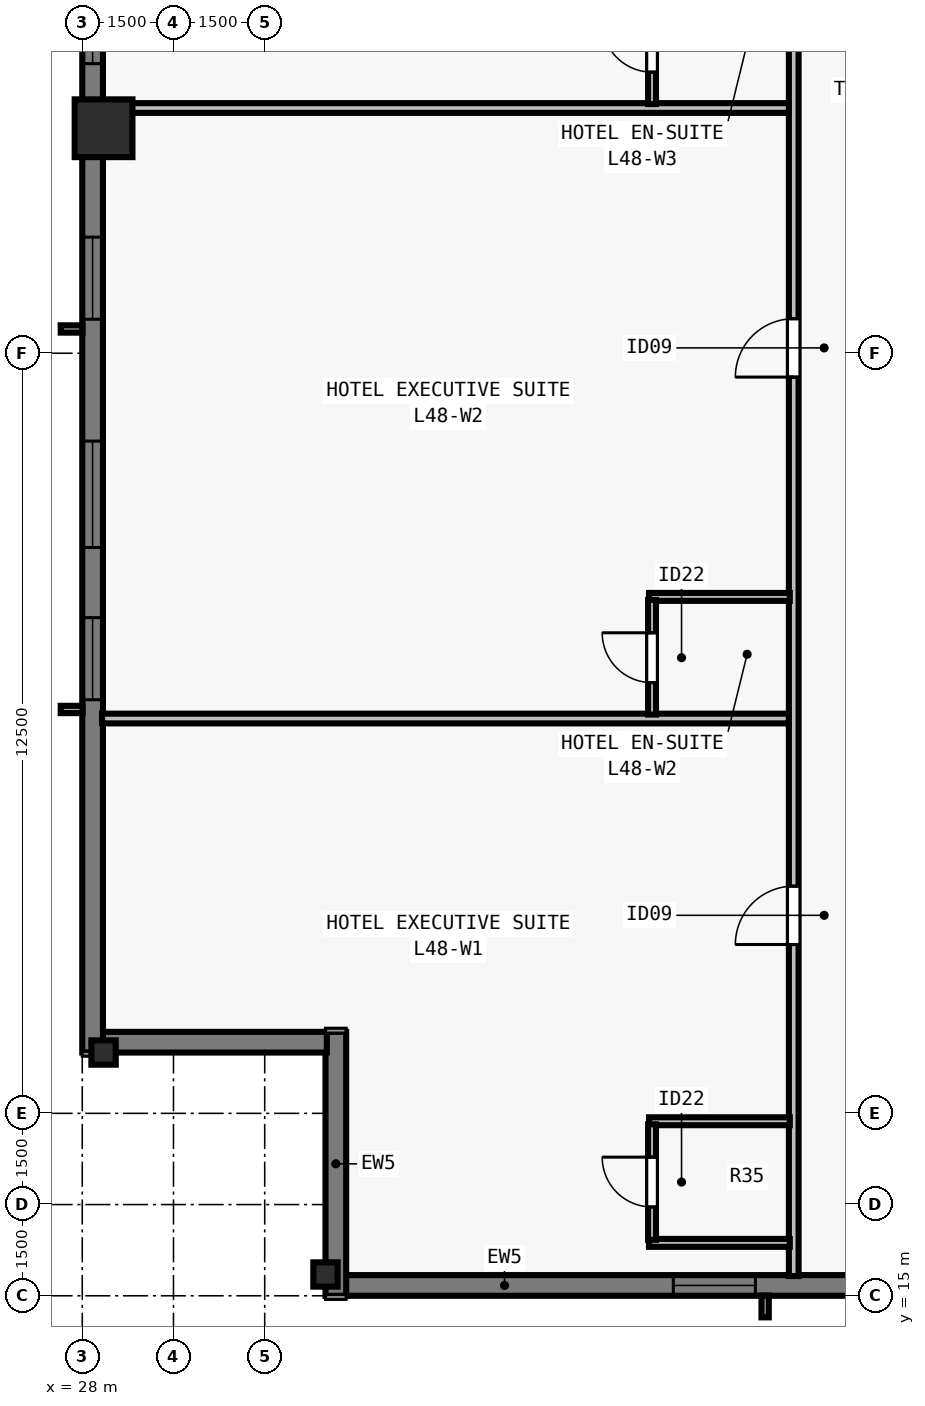
"""IFC4 building model, lengths in metres.
Left out: names, types, materials, properties, quantities, classifications, styles, units other than length and angle.
Written with IfcOpenShell. Run it as: python <this file> out.ifc"""

import sys

from ifc_helpers import new_model, si_unit, direction, frame, frame_2d, origin, origin_2d, place, context, subcontext, project, spatial, rectangle, i_section, extrude, element, fill, save


model = new_model("IFC4")
c1 = context("Model", 3, precision=1e-05, world=origin(), true_north=direction((0.0, 1.0)))
c2 = subcontext(c1, "Body", "Model", "MODEL_VIEW")
j1 = project(units=[si_unit("LENGTHUNIT", "METRE"), si_unit("PLANEANGLEUNIT", "RADIAN")], contexts=[c1])
p1 = place(None, origin())
s1 = spatial("IfcSite", under=j1, at=p1, CompositionType="ELEMENT")
p2 = place(p1, origin())
s2 = spatial("IfcBuilding", under=s1, at=p2, CompositionType="ELEMENT")
p3 = place(p2, frame((0.0, 0.0, 176.0)))
s3 = spatial("IfcBuildingStorey", under=s2, at=p3, CompositionType="ELEMENT", Elevation=176.0)
p4 = place(p3, frame((32.0, 15.35, 0.0), z_axis=(0.0, 0.0, 1.0), x_axis=(1.0, 0.0, 0.0)))
e1 = element("IfcColumn", 1, at=p4, inside=s3, PredefinedType="COLUMN", context=c2, shape_type="SweptSolid", body=[
    extrude(i_section(OverallWidth=0.4, OverallDepth=0.4, WebThickness=0.022, FlangeThickness=0.036, at=origin_2d()), origin(), (0.0, 0.0, 1.0), 3.5),
])
p5 = place(p3, frame((28.35, 34.2, 0.0), z_axis=(0.0, 0.0, 1.0), x_axis=(0.0, 1.0, 0.0)))
e2 = element("IfcColumn", 2, at=p5, inside=s3, PredefinedType="COLUMN", context=c2, shape_type="SweptSolid", body=[
    extrude(rectangle(XDim=0.95, YDim=0.95, at=origin_2d()), origin(), (0.0, 0.0, 1.0), 3.5),
])
p6 = place(p3, frame((28.35, 19.0, 0.0), z_axis=(0.0, 0.0, 1.0), x_axis=(0.0, 1.0, 0.0)))
e3 = element("IfcColumn", 3, at=p6, inside=s3, PredefinedType="COLUMN", context=c2, shape_type="SweptSolid", body=[
    extrude(i_section(OverallWidth=0.4, OverallDepth=0.4, WebThickness=0.022, FlangeThickness=0.036, at=origin_2d()), origin(), (0.0, 0.0, 1.0), 3.5),
])
p7 = place(p3, frame((72.0, 15.17, 0.0), z_axis=(0.0, 0.0, 1.0), x_axis=(-1.0, 0.0, 0.0)))
e4 = element("IfcWall", 4, at=p7, inside=s3, PredefinedType="SOLIDWALL", context=c2, shape_type="SweptSolid", body=[
    extrude(rectangle(XDim=39.682, YDim=0.34, at=frame_2d((19.841, 0.0))), origin(), (0.0, 0.0, 1.0), 3.28),
])
p8 = place(p7, frame((4.102, 0.0, 0.8)))
e5 = element("IfcOpeningElement", 5, at=p8, cuts=e4, PredefinedType="OPENING", context=c2, shape_type="SweptSolid", body=[
    extrude(rectangle(XDim=1.35, YDim=1.66, at=frame_2d((0.675, 0.83))), frame((0.0, 0.18, 0.0), z_axis=(0.0, -1.0, 0.0), x_axis=(1.0, 0.0, 0.0)), (0.0, 0.0, 1.0), 0.36),
])
p9 = place(p7, frame((8.305, 0.0, 0.8)))
e6 = element("IfcOpeningElement", 6, at=p9, cuts=e4, PredefinedType="OPENING", context=c2, shape_type="SweptSolid", body=[
    extrude(rectangle(XDim=1.75, YDim=1.66, at=frame_2d((0.875, 0.83))), frame((0.0, 0.18, 0.0), z_axis=(0.0, -1.0, 0.0), x_axis=(1.0, 0.0, 0.0)), (0.0, 0.0, 1.0), 0.36),
])
p10 = place(p7, frame((12.059, 0.0, 0.8)))
e7 = element("IfcOpeningElement", 7, at=p10, cuts=e4, PredefinedType="OPENING", context=c2, shape_type="SweptSolid", body=[
    extrude(rectangle(XDim=1.35, YDim=1.66, at=frame_2d((0.675, 0.83))), frame((0.0, 0.18, 0.0), z_axis=(0.0, -1.0, 0.0), x_axis=(1.0, 0.0, 0.0)), (0.0, 0.0, 1.0), 0.36),
])
p11 = place(p7, frame((16.262, 0.0, 0.8)))
e8 = element("IfcOpeningElement", 8, at=p11, cuts=e4, PredefinedType="OPENING", context=c2, shape_type="SweptSolid", body=[
    extrude(rectangle(XDim=1.75, YDim=1.66, at=frame_2d((0.875, 0.83))), frame((0.0, 0.18, 0.0), z_axis=(0.0, -1.0, 0.0), x_axis=(1.0, 0.0, 0.0)), (0.0, 0.0, 1.0), 0.36),
])
p12 = place(p7, frame((19.166, 0.0, 0.8)))
e9 = element("IfcOpeningElement", 9, at=p12, cuts=e4, PredefinedType="OPENING", context=c2, shape_type="SweptSolid", body=[
    extrude(rectangle(XDim=1.35, YDim=1.66, at=frame_2d((0.675, 0.83))), frame((0.0, 0.18, 0.0), z_axis=(0.0, -1.0, 0.0), x_axis=(1.0, 0.0, 0.0)), (0.0, 0.0, 1.0), 0.36),
])
p13 = place(p7, frame((21.27, 0.0, 0.8)))
e10 = element("IfcOpeningElement", 10, at=p13, cuts=e4, PredefinedType="OPENING", context=c2, shape_type="SweptSolid", body=[
    extrude(rectangle(XDim=1.75, YDim=1.66, at=frame_2d((0.875, 0.83))), frame((0.0, 0.18, 0.0), z_axis=(0.0, -1.0, 0.0), x_axis=(1.0, 0.0, 0.0)), (0.0, 0.0, 1.0), 0.36),
])
p14 = place(p7, frame((26.273, 0.0, 0.8)))
e11 = element("IfcOpeningElement", 11, at=p14, cuts=e4, PredefinedType="OPENING", context=c2, shape_type="SweptSolid", body=[
    extrude(rectangle(XDim=1.35, YDim=1.66, at=frame_2d((0.675, 0.83))), frame((0.0, 0.18, 0.0), z_axis=(0.0, -1.0, 0.0), x_axis=(1.0, 0.0, 0.0)), (0.0, 0.0, 1.0), 0.36),
])
p15 = place(p7, frame((32.93, 0.0, 0.8)))
e12 = element("IfcOpeningElement", 12, at=p15, cuts=e4, PredefinedType="OPENING", context=c2, shape_type="SweptSolid", body=[
    extrude(rectangle(XDim=1.35, YDim=1.66, at=frame_2d((0.675, 0.83))), frame((0.0, 0.18, 0.0), z_axis=(0.0, -1.0, 0.0), x_axis=(1.0, 0.0, 0.0)), (0.0, 0.0, 1.0), 0.36),
])
p16 = place(p3, frame((32.17, 15.0, 0.0), z_axis=(0.0, 0.0, 1.0), x_axis=(0.0, 1.0, 0.0)))
e13 = element("IfcWall", 13, at=p16, inside=s3, PredefinedType="SOLIDWALL", context=c2, shape_type="SweptSolid", body=[
    extrude(rectangle(XDim=4.34, YDim=0.34, at=frame_2d((2.17, 0.0))), origin(), (0.0, 0.0, 1.0), 3.28),
])
p17 = place(p3, frame((32.022, 19.17, 0.0), z_axis=(0.0, 0.0, 1.0), x_axis=(-1.0, 0.0, 0.0)))
e14 = element("IfcWall", 14, at=p17, inside=s3, PredefinedType="SOLIDWALL", context=c2, shape_type="SweptSolid", body=[
    extrude(rectangle(XDim=3.704, YDim=0.34, at=frame_2d((1.852, 0.0))), origin(), (0.0, 0.0, 1.0), 3.28),
])
p18 = place(p3, frame((28.17, 19.0, 0.0), z_axis=(0.0, 0.0, 1.0), x_axis=(0.0, 1.0, 0.0)))
e15 = element("IfcWall", 15, at=p18, inside=s3, PredefinedType="SOLIDWALL", context=c2, shape_type="SweptSolid", body=[
    extrude(rectangle(XDim=39.682, YDim=0.34, at=frame_2d((19.841, 0.0))), origin(), (0.0, 0.0, 1.0), 3.28),
])
p19 = place(p18, frame((5.802, 0.0, 0.8)))
e16 = element("IfcOpeningElement", 16, at=p19, cuts=e15, PredefinedType="OPENING", context=c2, shape_type="SweptSolid", body=[
    extrude(rectangle(XDim=1.35, YDim=1.66, at=frame_2d((0.675, 0.83))), frame((0.0, 0.18, 0.0), z_axis=(0.0, -1.0, 0.0), x_axis=(1.0, 0.0, 0.0)), (0.0, 0.0, 1.0), 0.36),
])
p20 = place(p18, frame((8.305, 0.0, 0.8)))
e17 = element("IfcOpeningElement", 17, at=p20, cuts=e15, PredefinedType="OPENING", context=c2, shape_type="SweptSolid", body=[
    extrude(rectangle(XDim=1.75, YDim=1.66, at=frame_2d((0.875, 0.83))), frame((0.0, 0.18, 0.0), z_axis=(0.0, -1.0, 0.0), x_axis=(1.0, 0.0, 0.0)), (0.0, 0.0, 1.0), 0.36),
])
p21 = place(p18, frame((12.059, 0.0, 0.8)))
e18 = element("IfcOpeningElement", 18, at=p21, cuts=e15, PredefinedType="OPENING", context=c2, shape_type="SweptSolid", body=[
    extrude(rectangle(XDim=1.35, YDim=1.66, at=frame_2d((0.675, 0.83))), frame((0.0, 0.18, 0.0), z_axis=(0.0, -1.0, 0.0), x_axis=(1.0, 0.0, 0.0)), (0.0, 0.0, 1.0), 0.36),
])
p22 = place(p18, frame((16.262, 0.0, 0.8)))
e19 = element("IfcOpeningElement", 19, at=p22, cuts=e15, PredefinedType="OPENING", context=c2, shape_type="SweptSolid", body=[
    extrude(rectangle(XDim=1.75, YDim=1.66, at=frame_2d((0.875, 0.83))), frame((0.0, 0.18, 0.0), z_axis=(0.0, -1.0, 0.0), x_axis=(1.0, 0.0, 0.0)), (0.0, 0.0, 1.0), 0.36),
])
p23 = place(p18, frame((19.166, 0.0, 0.8)))
e20 = element("IfcOpeningElement", 20, at=p23, cuts=e15, PredefinedType="OPENING", context=c2, shape_type="SweptSolid", body=[
    extrude(rectangle(XDim=1.35, YDim=1.66, at=frame_2d((0.675, 0.83))), frame((0.0, 0.18, 0.0), z_axis=(0.0, -1.0, 0.0), x_axis=(1.0, 0.0, 0.0)), (0.0, 0.0, 1.0), 0.36),
])
p24 = place(p18, frame((22.07, 0.0, 0.8)))
e21 = element("IfcOpeningElement", 21, at=p24, cuts=e15, PredefinedType="OPENING", context=c2, shape_type="SweptSolid", body=[
    extrude(rectangle(XDim=1.75, YDim=1.66, at=frame_2d((0.875, 0.83))), frame((0.0, 0.18, 0.0), z_axis=(0.0, -1.0, 0.0), x_axis=(1.0, 0.0, 0.0)), (0.0, 0.0, 1.0), 0.36),
])
p25 = place(p18, frame((26.273, 0.0, 0.8)))
e22 = element("IfcOpeningElement", 22, at=p25, cuts=e15, PredefinedType="OPENING", context=c2, shape_type="SweptSolid", body=[
    extrude(rectangle(XDim=1.35, YDim=1.66, at=frame_2d((0.675, 0.83))), frame((0.0, 0.18, 0.0), z_axis=(0.0, -1.0, 0.0), x_axis=(1.0, 0.0, 0.0)), (0.0, 0.0, 1.0), 0.36),
])
p26 = place(p18, frame((29.627, 0.0, 0.8)))
e23 = element("IfcOpeningElement", 23, at=p26, cuts=e15, PredefinedType="OPENING", context=c2, shape_type="SweptSolid", body=[
    extrude(rectangle(XDim=1.75, YDim=1.66, at=frame_2d((0.875, 0.83))), frame((0.0, 0.18, 0.0), z_axis=(0.0, -1.0, 0.0), x_axis=(1.0, 0.0, 0.0)), (0.0, 0.0, 1.0), 0.36),
])
p27 = place(p18, frame((32.53, 0.0, 0.8)))
e24 = element("IfcOpeningElement", 24, at=p27, cuts=e15, PredefinedType="OPENING", context=c2, shape_type="SweptSolid", body=[
    extrude(rectangle(XDim=1.35, YDim=1.66, at=frame_2d((0.675, 0.83))), frame((0.0, 0.18, 0.0), z_axis=(0.0, -1.0, 0.0), x_axis=(1.0, 0.0, 0.0)), (0.0, 0.0, 1.0), 0.36),
])
p28 = place(p3, frame((39.7, 15.325, 0.0), z_axis=(0.0, 0.0, 1.0), x_axis=(0.0, 1.0, 0.0)))
e25 = element("IfcWall", 25, at=p28, inside=s3, PredefinedType="PARTITIONING", context=c2, shape_type="SweptSolid", body=[
    extrude(rectangle(XDim=47.35, YDim=0.16, at=frame_2d((23.675, 0.0))), origin(), (0.0, 0.0, 1.0), 2.555),
])
p29 = place(p28, frame((5.451, 0.0, 0.0)))
e26 = element("IfcOpeningElement", 26, at=p29, cuts=e25, PredefinedType="OPENING", context=c2, shape_type="SweptSolid", body=[
    extrude(rectangle(XDim=0.96, YDim=2.15, at=frame_2d((0.48, 1.075))), frame((0.0, 0.09, 0.0), z_axis=(0.0, -1.0, 0.0), x_axis=(1.0, 0.0, 0.0)), (0.0, 0.0, 1.0), 0.18),
])
p30 = place(p28, frame((14.783, 0.0, 0.0)))
e27 = element("IfcOpeningElement", 27, at=p30, cuts=e25, PredefinedType="OPENING", context=c2, shape_type="SweptSolid", body=[
    extrude(rectangle(XDim=0.96, YDim=2.15, at=frame_2d((0.48, 1.075))), frame((0.0, 0.09, 0.0), z_axis=(0.0, -1.0, 0.0), x_axis=(1.0, 0.0, 0.0)), (0.0, 0.0, 1.0), 0.18),
])
p31 = place(p28, frame((24.215, 0.0, 0.0)))
e28 = element("IfcOpeningElement", 28, at=p31, cuts=e25, PredefinedType="OPENING", context=c2, shape_type="SweptSolid", body=[
    extrude(rectangle(XDim=0.96, YDim=2.15, at=frame_2d((0.48, 1.075))), frame((0.0, 0.09, 0.0), z_axis=(0.0, -1.0, 0.0), x_axis=(1.0, 0.0, 0.0)), (0.0, 0.0, 1.0), 0.18),
])
p32 = place(p28, frame((33.647, 0.0, 0.0)))
e29 = element("IfcOpeningElement", 29, at=p32, cuts=e25, PredefinedType="OPENING", context=c2, shape_type="SweptSolid", body=[
    extrude(rectangle(XDim=0.96, YDim=2.15, at=frame_2d((0.48, 1.075))), frame((0.0, 0.09, 0.0), z_axis=(0.0, -1.0, 0.0), x_axis=(1.0, 0.0, 0.0)), (0.0, 0.0, 1.0), 0.18),
])
p33 = place(p28, frame((43.258, 0.0, 0.0)))
e30 = element("IfcOpeningElement", 30, at=p33, cuts=e25, PredefinedType="OPENING", context=c2, shape_type="SweptSolid", body=[
    extrude(rectangle(XDim=0.96, YDim=2.15, at=frame_2d((0.48, 1.075))), frame((0.0, 0.09, 0.0), z_axis=(0.0, -1.0, 0.0), x_axis=(1.0, 0.0, 0.0)), (0.0, 0.0, 1.0), 0.18),
])
for number, where, z_axis, x_axis in (
    (31, (37.32, 15.87, 0.0), (0.0, 0.0, 1.0), (1.0, 0.0, 0.0)),
    (32, (37.32, 17.87, 0.0), (0.0, 0.0, 1.0), (1.0, 0.0, 0.0)),
):
    element("IfcWall", number, at=place(p3, frame(where, z_axis=z_axis, x_axis=x_axis)), inside=s3, PredefinedType="PLUMBINGWALL", context=c2, shape_type="SweptSolid", body=[
        extrude(rectangle(XDim=2.315, YDim=0.13, at=frame_2d((1.157, 0.0))), origin(), (0.0, 0.0, 1.0), 3.28),
    ])
p34 = place(p3, frame((37.37, 15.92, 0.0), z_axis=(0.0, 0.0, 1.0), x_axis=(0.0, 1.0, 0.0)))
e33 = element("IfcWall", 33, at=p34, inside=s3, PredefinedType="PLUMBINGWALL", context=c2, shape_type="SweptSolid", body=[
    extrude(rectangle(XDim=1.9, YDim=0.13, at=frame_2d((0.95, 0.0))), origin(), (0.0, 0.0, 1.0), 3.28),
])
p35 = place(p34, frame((0.54, 0.0, 0.0)))
e34 = element("IfcOpeningElement", 34, at=p35, cuts=e33, PredefinedType="OPENING", context=c2, shape_type="SweptSolid", body=[
    extrude(rectangle(XDim=0.82, YDim=2.1, at=frame_2d((0.41, 1.05))), frame((0.0, 0.075, 0.0), z_axis=(0.0, -1.0, 0.0), x_axis=(1.0, 0.0, 0.0)), (0.0, 0.0, 1.0), 0.15),
])
p36 = place(p3, frame((28.325, 24.493, 0.0), z_axis=(0.0, 0.0, 1.0), x_axis=(1.0, 0.0, 0.0)))
e35 = element("IfcWall", 35, at=p36, inside=s3, PredefinedType="PARTITIONING", context=c2, shape_type="SweptSolid", body=[
    extrude(rectangle(XDim=11.295, YDim=0.16, at=frame_2d((5.647, 0.0))), origin(), (0.0, 0.0, 1.0), 2.896),
])
p37 = place(p3, frame((37.32, 26.493, 0.0), z_axis=(0.0, 0.0, 1.0), x_axis=(1.0, 0.0, 0.0)))
e36 = element("IfcWall", 36, at=p37, inside=s3, PredefinedType="PLUMBINGWALL", context=c2, shape_type="SweptSolid", body=[
    extrude(rectangle(XDim=2.315, YDim=0.13, at=frame_2d((1.157, 0.0))), origin(), (0.0, 0.0, 1.0), 2.896),
])
p38 = place(p3, frame((37.37, 24.558, 0.0), z_axis=(0.0, 0.0, 1.0), x_axis=(0.0, 1.0, 0.0)))
e37 = element("IfcWall", 37, at=p38, inside=s3, PredefinedType="PLUMBINGWALL", context=c2, shape_type="SweptSolid", body=[
    extrude(rectangle(XDim=1.885, YDim=0.13, at=frame_2d((0.942, 0.0))), origin(), (0.0, 0.0, 1.0), 3.28),
])
p39 = place(p38, frame((0.525, 0.0, 0.0)))
e38 = element("IfcOpeningElement", 38, at=p39, cuts=e37, PredefinedType="OPENING", context=c2, shape_type="SweptSolid", body=[
    extrude(rectangle(XDim=0.82, YDim=2.1, at=frame_2d((0.41, 1.05))), frame((0.0, 0.075, 0.0), z_axis=(0.0, -1.0, 0.0), x_axis=(1.0, 0.0, 0.0)), (0.0, 0.0, 1.0), 0.15),
])
p40 = place(p3, frame((28.325, 34.533, 0.0), z_axis=(0.0, 0.0, 1.0), x_axis=(1.0, 0.0, 0.0)))
e39 = element("IfcWall", 39, at=p40, inside=s3, PredefinedType="PARTITIONING", context=c2, shape_type="SweptSolid", body=[
    extrude(rectangle(XDim=11.295, YDim=0.16, at=frame_2d((5.647, 0.0))), origin(), (0.0, 0.0, 1.0), 2.896),
])
p41 = place(p3, frame((37.37, 34.598, 0.0), z_axis=(0.0, 0.0, 1.0), x_axis=(0.0, 1.0, 0.0)))
e40 = element("IfcWall", 40, at=p41, inside=s3, PredefinedType="PLUMBINGWALL", context=c2, shape_type="SweptSolid", body=[
    extrude(rectangle(XDim=1.885, YDim=0.13, at=frame_2d((0.942, 0.0))), origin(), (0.0, 0.0, 1.0), 3.28),
])
p42 = place(p41, frame((0.525, 0.0, 0.0)))
e41 = element("IfcOpeningElement", 41, at=p42, cuts=e40, PredefinedType="OPENING", context=c2, shape_type="SweptSolid", body=[
    extrude(rectangle(XDim=0.82, YDim=2.1, at=frame_2d((0.41, 1.05))), frame((0.0, 0.075, 0.0), z_axis=(0.0, -1.0, 0.0), x_axis=(1.0, 0.0, 0.0)), (0.0, 0.0, 1.0), 0.15),
])
p43 = place(p15, origin())
e42 = element("IfcWindow", 42, at=p43, inside=s3, PartitioningType="SINGLE_PANEL", PredefinedType="WINDOW", context=c2, shape_type="SweptSolid", body=[
    extrude(rectangle(XDim=1.35, YDim=1.66, at=frame_2d((0.675, 0.83))), frame((0.0, -0.05, 0.0), z_axis=(0.0, -1.0, 0.0), x_axis=(1.0, 0.0, 0.0)), (0.0, 0.0, 1.0), 0.06),
])
fill(e12, e42)
p44 = place(p19, origin())
e43 = element("IfcWindow", 43, at=p44, inside=s3, PartitioningType="SINGLE_PANEL", PredefinedType="WINDOW", context=c2, shape_type="SweptSolid", body=[
    extrude(rectangle(XDim=1.35, YDim=1.66, at=frame_2d((0.675, 0.83))), frame((0.0, -0.05, 0.0), z_axis=(0.0, -1.0, 0.0), x_axis=(1.0, 0.0, 0.0)), (0.0, 0.0, 1.0), 0.06),
])
fill(e16, e43)
p45 = place(p20, origin())
e44 = element("IfcWindow", 44, at=p45, inside=s3, PartitioningType="SINGLE_PANEL", PredefinedType="WINDOW", context=c2, shape_type="SweptSolid", body=[
    extrude(rectangle(XDim=1.75, YDim=1.66, at=frame_2d((0.875, 0.83))), frame((0.0, -0.05, 0.0), z_axis=(0.0, -1.0, 0.0), x_axis=(1.0, 0.0, 0.0)), (0.0, 0.0, 1.0), 0.06),
])
fill(e17, e44)
p46 = place(p21, origin())
e45 = element("IfcWindow", 45, at=p46, inside=s3, PartitioningType="SINGLE_PANEL", PredefinedType="WINDOW", context=c2, shape_type="SweptSolid", body=[
    extrude(rectangle(XDim=1.35, YDim=1.66, at=frame_2d((0.675, 0.83))), frame((0.0, -0.05, 0.0), z_axis=(0.0, -1.0, 0.0), x_axis=(1.0, 0.0, 0.0)), (0.0, 0.0, 1.0), 0.06),
])
fill(e18, e45)
p47 = place(p22, origin())
e46 = element("IfcWindow", 46, at=p47, inside=s3, PartitioningType="SINGLE_PANEL", PredefinedType="WINDOW", context=c2, shape_type="SweptSolid", body=[
    extrude(rectangle(XDim=1.75, YDim=1.66, at=frame_2d((0.875, 0.83))), frame((0.0, -0.05, 0.0), z_axis=(0.0, -1.0, 0.0), x_axis=(1.0, 0.0, 0.0)), (0.0, 0.0, 1.0), 0.06),
])
fill(e19, e46)
p48 = place(p35, origin())
e47 = element("IfcDoor", 47, at=p48, inside=s3, OperationType="SINGLE_SWING_RIGHT", PredefinedType="DOOR", context=c2, shape_type="SweptSolid", body=[
    extrude(rectangle(XDim=0.82, YDim=2.1, at=frame_2d((0.41, 1.05))), frame((0.0, 0.025, 0.0), z_axis=(0.0, -1.0, 0.0), x_axis=(1.0, 0.0, 0.0)), (0.0, 0.0, 1.0), 0.05),
])
fill(e34, e47)
p49 = place(p29, origin())
e48 = element("IfcDoor", 48, at=p49, inside=s3, OperationType="SINGLE_SWING_LEFT", PredefinedType="DOOR", context=c2, shape_type="SweptSolid", body=[
    extrude(rectangle(XDim=0.96, YDim=2.15, at=frame_2d((0.48, 1.075))), frame((0.0, 0.025, 0.0), z_axis=(0.0, -1.0, 0.0), x_axis=(1.0, 0.0, 0.0)), (0.0, 0.0, 1.0), 0.05),
])
fill(e26, e48)
p50 = place(p39, origin())
e49 = element("IfcDoor", 49, at=p50, inside=s3, OperationType="SINGLE_SWING_RIGHT", PredefinedType="DOOR", context=c2, shape_type="SweptSolid", body=[
    extrude(rectangle(XDim=0.82, YDim=2.1, at=frame_2d((0.41, 1.05))), frame((0.0, 0.025, 0.0), z_axis=(0.0, -1.0, 0.0), x_axis=(1.0, 0.0, 0.0)), (0.0, 0.0, 1.0), 0.05),
])
fill(e38, e49)
p51 = place(p30, origin())
e50 = element("IfcDoor", 50, at=p51, inside=s3, OperationType="SINGLE_SWING_LEFT", PredefinedType="DOOR", context=c2, shape_type="SweptSolid", body=[
    extrude(rectangle(XDim=0.96, YDim=2.15, at=frame_2d((0.48, 1.075))), frame((0.0, 0.025, 0.0), z_axis=(0.0, -1.0, 0.0), x_axis=(1.0, 0.0, 0.0)), (0.0, 0.0, 1.0), 0.05),
])
fill(e27, e50)
p52 = place(p42, origin())
e51 = element("IfcDoor", 51, at=p52, inside=s3, OperationType="SINGLE_SWING_RIGHT", PredefinedType="DOOR", context=c2, shape_type="SweptSolid", body=[
    extrude(rectangle(XDim=0.82, YDim=2.1, at=frame_2d((0.41, 1.05))), frame((0.0, 0.025, 0.0), z_axis=(0.0, -1.0, 0.0), x_axis=(1.0, 0.0, 0.0)), (0.0, 0.0, 1.0), 0.05),
])
fill(e41, e51)
save(model, sys.argv[1])
